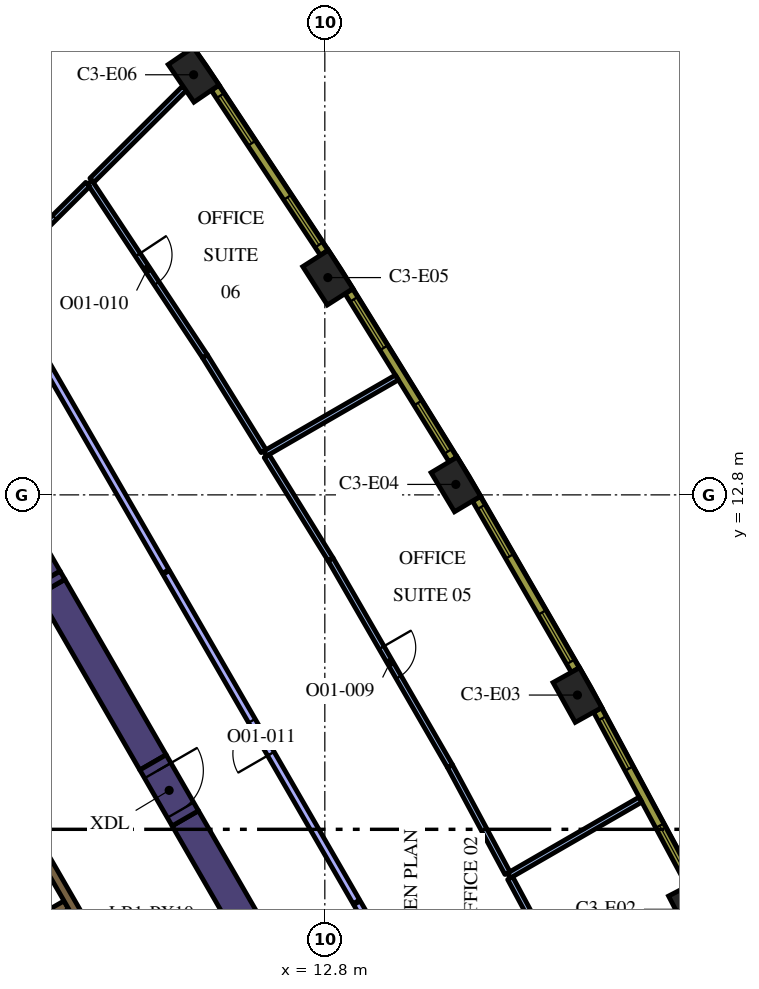
"""IFC4 building model, lengths in metres.
Left out: names, types, materials, properties, quantities, classifications, styles, units other than length and angle.
Written with IfcOpenShell. Run it as: python <this file> out.ifc"""

import sys

from ifc_helpers import new_model, si_unit, direction, frame, frame_2d, origin, origin_2d, place, context, subcontext, project, spatial, polyline, rectangle, outline, extrude, element, fill, save


model = new_model("IFC4")
c1 = context("Model", 3, precision=1e-05, world=origin(), true_north=direction((0.0, 1.0)))
c2 = subcontext(c1, "Body", "Model", "MODEL_VIEW")
j1 = project(units=[si_unit("LENGTHUNIT", "METRE"), si_unit("PLANEANGLEUNIT", "RADIAN")], contexts=[c1])
p1 = place(None, origin())
s1 = spatial("IfcSite", under=j1, at=p1, CompositionType="ELEMENT")
p2 = place(p1, origin())
s2 = spatial("IfcBuilding", under=s1, at=p2, CompositionType="ELEMENT")
p3 = place(p2, frame((0.0, 0.0, 150.0)))
s3 = spatial("IfcBuildingStorey", under=s2, at=p3, CompositionType="ELEMENT", Elevation=150.0)
for number, where, z_axis, x_axis in (
    (1, (22.476, 1.896, 0.0), (0.0, 0.0, 1.0), (-0.46, 0.888, 0.0)),
    (2, (19.447, 7.533, 0.0), (0.0, 0.0, 1.0), (-0.487, 0.874, 0.0)),
    (3, (16.247, 13.075, 0.0), (0.0, 0.0, 1.0), (-0.513, 0.858, 0.0)),
    (4, (12.88, 18.517, 0.0), (0.0, 0.0, 1.0), (-0.539, 0.842, 0.0)),
    (5, (9.348, 23.854, 0.0), (0.0, 0.0, 1.0), (-0.565, 0.825, 0.0)),
):
    element("IfcColumn", number, at=place(p3, frame(where, z_axis=z_axis, x_axis=x_axis)), inside=s3, PredefinedType="COLUMN", context=c2, shape_type="SweptSolid", body=[
        extrude(rectangle(XDim=1.2, YDim=0.8, at=origin_2d()), origin(), (0.0, 0.0, 1.0), 4.2),
    ])
p4 = place(p3, frame((9.129, 4.289, 0.0), z_axis=(0.0, 0.0, 1.0), x_axis=(0.499995742806, -0.866027861663, 0.0)))
e6 = element("IfcWall", 6, at=p4, inside=s3, PredefinedType="SOLIDWALL", context=c2, shape_type="SweptSolid", body=[
    extrude(rectangle(XDim=12.527, YDim=0.8, at=frame_2d((6.264, 0.0))), origin(), (0.0, 0.0, 1.0), 4.2),
])
p5 = place(p3, frame((5.489, 10.594, 0.0), z_axis=(0.0, 0.0, 1.0), x_axis=(-0.500000383388, 0.866025182435, 0.0)))
e7 = element("IfcWall", 7, at=p5, inside=s3, PredefinedType="SOLIDWALL", context=c2, shape_type="SweptSolid", body=[
    extrude(rectangle(XDim=0.558, YDim=0.8, at=frame_2d((0.279, 0.0))), origin(), (0.0, 0.0, 1.0), 4.2),
])
p6 = place(p3, frame((5.615, 10.375, 0.0), z_axis=(0.0, 0.0, 1.0), x_axis=(0.500002746266, -0.866023818221, 0.0)))
e8 = element("IfcWall", 8, at=p6, inside=s3, PredefinedType="SOLIDWALL", context=c2, shape_type="SweptSolid", body=[
    extrude(rectangle(XDim=5.328, YDim=0.8, at=frame_2d((2.664, 0.0))), origin(), (0.0, 0.0, 1.0), 4.2),
])
p7 = place(p3, origin())
e9 = element("IfcWall", 9, at=p7, inside=s3, PredefinedType="SOLIDWALL", context=c2, shape_type="SweptSolid", body=[
    extrude(outline(polyline([(5.432, 10.272), (5.308, 10.487), (5.836, 10.792), (5.96, 10.577), (5.432, 10.272)])), origin(), (0.0, 0.0, 1.0), 4.2),
])
p8 = place(p3, frame((5.97, -2.591, 0.0), z_axis=(0.0, 0.0, 1.0), x_axis=(-0.499994469932, 0.866028596547, 0.0)))
e10 = element("IfcWall", 10, at=p8, inside=s3, PredefinedType="SOLIDWALL", context=c2, shape_type="SweptSolid", body=[
    extrude(rectangle(XDim=10.488, YDim=0.25, at=frame_2d((5.244, 0.0))), origin(), (0.0, 0.0, 1.0), 4.2),
])
p9 = place(p3, frame((4.094, 0.909, 0.0), z_axis=(0.0, 0.0, 1.0), x_axis=(0.866008176907, 0.50002983664, 0.0)))
e11 = element("IfcWall", 11, at=p9, inside=s3, PredefinedType="SOLIDWALL", context=c2, shape_type="SweptSolid", body=[
    extrude(rectangle(XDim=2.2, YDim=0.25, at=frame_2d((1.1, 0.0))), origin(), (0.0, 0.0, 1.0), 4.2),
])
p10 = place(p3, frame((8.565, -2.185, 0.0), z_axis=(0.0, 0.0, 1.0), x_axis=(-0.499997954832, 0.866026584559, 0.0)))
e12 = element("IfcWall", 12, at=p10, inside=s3, PredefinedType="SOLIDWALL", context=c2, shape_type="SweptSolid", body=[
    extrude(rectangle(XDim=12.35, YDim=0.25, at=frame_2d((6.175, 0.0))), origin(), (0.0, 0.0, 1.0), 4.2),
])
p11 = place(p10, frame((0.585, 0.0, 0.0)))
e13 = element("IfcOpeningElement", 13, at=p11, cuts=e12, PredefinedType="OPENING", context=c2, shape_type="SweptSolid", body=[
    extrude(rectangle(XDim=1.1, YDim=2.1, at=frame_2d((0.55, 1.05))), frame((0.0, 0.135, 0.0), z_axis=(0.0, -1.0, 0.0), x_axis=(1.0, 0.0, 0.0)), (0.0, 0.0, 1.0), 0.27),
])
p12 = place(p3, frame((8.279, 5.761, 0.0), z_axis=(0.0, 0.0, 1.0), x_axis=(0.500062241894, -0.865989465428, 0.0)))
e14 = element("IfcWall", 14, at=p12, inside=s3, PredefinedType="SOLIDWALL", context=c2, shape_type="SweptSolid", body=[
    extrude(rectangle(XDim=1.7, YDim=0.8, at=frame_2d((0.85, 0.0))), origin(), (0.0, 0.0, 1.0), 4.2),
])
p13 = place(p12, frame((0.25, 0.0, 0.0)))
e15 = element("IfcOpeningElement", 15, at=p13, cuts=e14, PredefinedType="OPENING", context=c2, shape_type="SweptSolid", body=[
    extrude(rectangle(XDim=1.2, YDim=2.1, at=frame_2d((0.6, 1.05))), frame((0.0, 0.41, 0.0), z_axis=(0.0, -1.0, 0.0), x_axis=(1.0, 0.0, 0.0)), (0.0, 0.0, 1.0), 0.82),
])
p14 = place(p3, frame((17.641, 2.781, 0.0), z_axis=(0.0, 0.0, 1.0), x_axis=(0.866053520969, 0.499951296445, 0.0)))
e16 = element("IfcWall", 16, at=p14, inside=s3, PredefinedType="PARTITIONING", context=c2, shape_type="SweptSolid", body=[
    extrude(rectangle(XDim=4.002, YDim=0.15, at=frame_2d((2.001, 0.0))), origin(), (0.0, 0.0, 1.0), 3.15),
])
p15 = place(p3, frame((19.066, 0.129, 0.0), z_axis=(0.0, 0.0, 1.0), x_axis=(-0.473335829303, 0.880882053795, 0.0)))
e17 = element("IfcWall", 17, at=p15, inside=s3, PredefinedType="PARTITIONING", context=c2, shape_type="SweptSolid", body=[
    extrude(rectangle(XDim=2.935, YDim=0.15, at=frame_2d((1.468, 0.0))), origin(), (0.0, 0.0, 1.0), 3.15),
])
p16 = place(p3, frame((11.229, 13.887, 0.0), z_axis=(0.0, 0.0, 1.0), x_axis=(0.866038271014, 0.499977712642, 0.0)))
e18 = element("IfcWall", 18, at=p16, inside=s3, PredefinedType="PARTITIONING", context=c2, shape_type="SweptSolid", body=[
    extrude(rectangle(XDim=4.002, YDim=0.15, at=frame_2d((2.001, 0.0))), origin(), (0.0, 0.0, 1.0), 3.15),
])
p17 = place(p3, frame((17.606, 2.847, 0.0), z_axis=(0.0, 0.0, 1.0), x_axis=(-0.473348321673, 0.880875340993, 0.0)))
e19 = element("IfcWall", 19, at=p17, inside=s3, PredefinedType="PARTITIONING", context=c2, shape_type="SweptSolid", body=[
    extrude(rectangle(XDim=3.197, YDim=0.15, at=frame_2d((1.599, 0.0))), origin(), (0.0, 0.0, 1.0), 3.15),
])
p18 = place(p3, frame((12.951, 11.104, 0.0), z_axis=(0.0, 0.0, 1.0), x_axis=(0.499992691614, -0.866029623242, 0.0)))
e20 = element("IfcWall", 20, at=p18, inside=s3, PredefinedType="PARTITIONING", context=c2, shape_type="SweptSolid", body=[
    extrude(rectangle(XDim=6.282, YDim=0.15, at=frame_2d((3.141, 0.0))), origin(), (0.0, 0.0, 1.0), 3.15),
])
p19 = place(p18, frame((2.683, 0.0, 0.0)))
e21 = element("IfcOpeningElement", 21, at=p19, cuts=e20, PredefinedType="OPENING", context=c2, shape_type="SweptSolid", body=[
    extrude(rectangle(XDim=0.9, YDim=2.1, at=frame_2d((0.45, 1.05))), frame((0.0, 0.085, 0.0), z_axis=(0.0, -1.0, 0.0), x_axis=(1.0, 0.0, 0.0)), (0.0, 0.0, 1.0), 0.17),
])
p20 = place(p3, frame((12.951, 11.104, 0.0), z_axis=(0.0, 0.0, 1.0), x_axis=(-0.526204763311, 0.850357893518, 0.0)))
e22 = element("IfcWall", 22, at=p20, inside=s3, PredefinedType="PARTITIONING", context=c2, shape_type="SweptSolid", body=[
    extrude(rectangle(XDim=3.197, YDim=0.15, at=frame_2d((1.599, 0.0))), origin(), (0.0, 0.0, 1.0), 3.15),
])
p21 = place(p3, frame((11.19, 13.951, 0.0), z_axis=(0.0, 0.0, 1.0), x_axis=(-0.526165616903, 0.850382116221, 0.0)))
e23 = element("IfcWall", 23, at=p21, inside=s3, PredefinedType="PARTITIONING", context=c2, shape_type="SweptSolid", body=[
    extrude(rectangle(XDim=2.935, YDim=0.15, at=frame_2d((1.468, 0.0))), origin(), (0.0, 0.0, 1.0), 3.15),
])
p22 = place(p3, frame((6.616, 21.024, 0.0), z_axis=(0.0, 0.0, 1.0), x_axis=(0.551915124006, -0.833900291338, 0.0)))
e24 = element("IfcWall", 24, at=p22, inside=s3, PredefinedType="PARTITIONING", context=c2, shape_type="SweptSolid", body=[
    extrude(rectangle(XDim=5.488, YDim=0.15, at=frame_2d((2.744, 0.0))), origin(), (0.0, 0.0, 1.0), 3.15),
])
p23 = place(p22, frame((2.288, 0.0, 0.0)))
e25 = element("IfcOpeningElement", 25, at=p23, cuts=e24, PredefinedType="OPENING", context=c2, shape_type="SweptSolid", body=[
    extrude(rectangle(XDim=0.9, YDim=2.1, at=frame_2d((0.45, 1.05))), frame((0.0, 0.085, 0.0), z_axis=(0.0, -1.0, 0.0), x_axis=(1.0, 0.0, 0.0)), (0.0, 0.0, 1.0), 0.17),
])
p24 = place(p3, frame((6.67, 21.078, 0.0), z_axis=(0.0, 0.0, 1.0), x_axis=(0.709236178776, 0.704970951681, 0.0)))
e26 = element("IfcWall", 26, at=p24, inside=s3, PredefinedType="PARTITIONING", context=c2, shape_type="SweptSolid", body=[
    extrude(rectangle(XDim=3.434, YDim=0.15, at=frame_2d((1.717, 0.0))), origin(), (0.0, 0.0, 1.0), 3.15),
])
p25 = place(p3, frame((4.128, 18.55, 0.0), z_axis=(0.0, 0.0, 1.0), x_axis=(0.709237676072, 0.704969445324, 0.0)))
e27 = element("IfcWall", 27, at=p25, inside=s3, PredefinedType="PARTITIONING", context=c2, shape_type="SweptSolid", body=[
    extrude(rectangle(XDim=3.432, YDim=0.15, at=frame_2d((1.716, 0.0))), origin(), (0.0, 0.0, 1.0), 3.15),
])
p26 = place(p25, frame((1.3, 0.0, 0.0)))
e28 = element("IfcOpeningElement", 28, at=p26, cuts=e27, PredefinedType="OPENING", context=c2, shape_type="SweptSolid", body=[
    extrude(rectangle(XDim=0.9, YDim=2.1, at=frame_2d((0.45, 1.05))), frame((0.0, 0.085, 0.0), z_axis=(0.0, -1.0, 0.0), x_axis=(1.0, 0.0, 0.0)), (0.0, 0.0, 1.0), 0.17),
])
p27 = place(p3, frame((13.63, 2.091, 0.0), z_axis=(0.0, 0.0, 1.0), x_axis=(-0.499990634175, 0.866030811078, 0.0)))
e29 = element("IfcWall", 29, at=p27, inside=s3, PredefinedType="PARTITIONING", context=c2, shape_type="SweptSolid", body=[
    extrude(rectangle(XDim=10.008, YDim=0.2, at=frame_2d((5.004, 0.0))), origin(), (0.0, 0.0, 1.0), 3.15),
])
p28 = place(p27, frame((4.5, 0.0, 0.0)))
e30 = element("IfcOpeningElement", 30, at=p28, cuts=e29, PredefinedType="OPENING", context=c2, shape_type="SweptSolid", body=[
    extrude(rectangle(XDim=1.0, YDim=2.1, at=frame_2d((0.5, 1.05))), frame((0.0, 0.11, 0.0), z_axis=(0.0, -1.0, 0.0), x_axis=(1.0, 0.0, 0.0)), (0.0, 0.0, 1.0), 0.22),
])
p29 = place(p3, frame((8.611, 10.785, 0.0), z_axis=(0.0, 0.0, 1.0), x_axis=(-0.499987928593, 0.866032373102, 0.0)))
e31 = element("IfcWall", 31, at=p29, inside=s3, PredefinedType="PARTITIONING", context=c2, shape_type="SweptSolid", body=[
    extrude(rectangle(XDim=8.889, YDim=0.2, at=frame_2d((4.445, 0.0))), origin(), (0.0, 0.0, 1.0), 3.15),
])
p30 = place(p3, frame((18.504, -6.35, 0.0), z_axis=(0.0, 0.0, 1.0), x_axis=(-0.499995029582, 0.866028273438, 0.0)))
e32 = element("IfcWall", 32, at=p30, inside=s3, PredefinedType="PARTITIONING", context=c2, shape_type="SweptSolid", body=[
    extrude(rectangle(XDim=9.717, YDim=0.2, at=frame_2d((4.859, 0.0))), origin(), (0.0, 0.0, 1.0), 3.15),
])
p31 = place(p3, frame((22.44, 2.555, 0.0), z_axis=(0.0, 0.0, 1.0), x_axis=(-0.473349833294, 0.880874528704, 0.0)))
e33 = element("IfcWall", 33, at=p31, inside=s3, PredefinedType="SOLIDWALL", context=c2, shape_type="SweptSolid", body=[
    extrude(rectangle(XDim=5.204, YDim=0.24, at=frame_2d((2.602, 0.0))), origin(), (0.0, 0.0, 1.0), 3.95),
])
p32 = place(p31, frame((0.248, 0.0, 0.9)))
e34 = element("IfcOpeningElement", 34, at=p32, cuts=e33, PredefinedType="OPENING", context=c2, shape_type="SweptSolid", body=[
    extrude(rectangle(XDim=1.5, YDim=2.55, at=frame_2d((0.75, 1.275))), frame((0.0, 0.13, 0.0), z_axis=(0.0, -1.0, 0.0), x_axis=(1.0, 0.0, 0.0)), (0.0, 0.0, 1.0), 0.26),
])
p33 = place(p31, frame((3.455, 0.0, 0.9)))
e35 = element("IfcOpeningElement", 35, at=p33, cuts=e33, PredefinedType="OPENING", context=c2, shape_type="SweptSolid", body=[
    extrude(rectangle(XDim=1.5, YDim=2.55, at=frame_2d((0.75, 1.275))), frame((0.0, 0.13, 0.0), z_axis=(0.0, -1.0, 0.0), x_axis=(1.0, 0.0, 0.0)), (0.0, 0.0, 1.0), 0.26),
])
p34 = place(p3, frame((19.391, 8.191, 0.0), z_axis=(0.0, 0.0, 1.0), x_axis=(-0.500009456303, 0.866019944116, 0.0)))
e36 = element("IfcWall", 36, at=p34, inside=s3, PredefinedType="SOLIDWALL", context=c2, shape_type="SweptSolid", body=[
    extrude(rectangle(XDim=5.204, YDim=0.24, at=frame_2d((2.602, 0.0))), origin(), (0.0, 0.0, 1.0), 3.95),
])
p35 = place(p34, frame((0.248, 0.0, 0.9)))
e37 = element("IfcOpeningElement", 37, at=p35, cuts=e36, PredefinedType="OPENING", context=c2, shape_type="SweptSolid", body=[
    extrude(rectangle(XDim=1.5, YDim=2.55, at=frame_2d((0.75, 1.275))), frame((0.0, 0.13, 0.0), z_axis=(0.0, -1.0, 0.0), x_axis=(1.0, 0.0, 0.0)), (0.0, 0.0, 1.0), 0.26),
])
p36 = place(p34, frame((3.455, 0.0, 0.9)))
e38 = element("IfcOpeningElement", 38, at=p36, cuts=e36, PredefinedType="OPENING", context=c2, shape_type="SweptSolid", body=[
    extrude(rectangle(XDim=1.5, YDim=2.55, at=frame_2d((0.75, 1.275))), frame((0.0, 0.13, 0.0), z_axis=(0.0, -1.0, 0.0), x_axis=(1.0, 0.0, 0.0)), (0.0, 0.0, 1.0), 0.26),
])
p37 = place(p3, frame((16.171, 13.731, 0.0), z_axis=(0.0, 0.0, 1.0), x_axis=(-0.526197926587, 0.850362124072, 0.0)))
e39 = element("IfcWall", 39, at=p37, inside=s3, PredefinedType="SOLIDWALL", context=c2, shape_type="SweptSolid", body=[
    extrude(rectangle(XDim=5.203, YDim=0.24, at=frame_2d((2.602, 0.0))), origin(), (0.0, 0.0, 1.0), 3.95),
])
p38 = place(p37, frame((0.248, 0.0, 0.9)))
e40 = element("IfcOpeningElement", 40, at=p38, cuts=e39, PredefinedType="OPENING", context=c2, shape_type="SweptSolid", body=[
    extrude(rectangle(XDim=1.5, YDim=2.55, at=frame_2d((0.75, 1.275))), frame((0.0, 0.13, 0.0), z_axis=(0.0, -1.0, 0.0), x_axis=(1.0, 0.0, 0.0)), (0.0, 0.0, 1.0), 0.26),
])
p39 = place(p37, frame((3.455, 0.0, 0.9)))
e41 = element("IfcOpeningElement", 41, at=p39, cuts=e39, PredefinedType="OPENING", context=c2, shape_type="SweptSolid", body=[
    extrude(rectangle(XDim=1.5, YDim=2.55, at=frame_2d((0.75, 1.275))), frame((0.0, 0.13, 0.0), z_axis=(0.0, -1.0, 0.0), x_axis=(1.0, 0.0, 0.0)), (0.0, 0.0, 1.0), 0.26),
])
p40 = place(p3, frame((12.783, 19.171, 0.0), z_axis=(0.0, 0.0, 1.0), x_axis=(-0.551892811511, 0.833915058386, 0.0)))
e42 = element("IfcWall", 42, at=p40, inside=s3, PredefinedType="SOLIDWALL", context=c2, shape_type="SweptSolid", body=[
    extrude(rectangle(XDim=5.204, YDim=0.24, at=frame_2d((2.602, 0.0))), origin(), (0.0, 0.0, 1.0), 3.95),
])
p41 = place(p40, frame((0.248, 0.0, 0.9)))
e43 = element("IfcOpeningElement", 43, at=p41, cuts=e42, PredefinedType="OPENING", context=c2, shape_type="SweptSolid", body=[
    extrude(rectangle(XDim=1.5, YDim=2.55, at=frame_2d((0.75, 1.275))), frame((0.0, 0.13, 0.0), z_axis=(0.0, -1.0, 0.0), x_axis=(1.0, 0.0, 0.0)), (0.0, 0.0, 1.0), 0.26),
])
p42 = place(p40, frame((3.455, 0.0, 0.9)))
e44 = element("IfcOpeningElement", 44, at=p42, cuts=e42, PredefinedType="OPENING", context=c2, shape_type="SweptSolid", body=[
    extrude(rectangle(XDim=1.5, YDim=2.55, at=frame_2d((0.75, 1.275))), frame((0.0, 0.13, 0.0), z_axis=(0.0, -1.0, 0.0), x_axis=(1.0, 0.0, 0.0)), (0.0, 0.0, 1.0), 0.26),
])
p43 = place(p3, frame((9.231, 24.504, 0.0), z_axis=(0.0, 0.0, 1.0), x_axis=(-0.577115207679, 0.816662743772, 0.0)))
e45 = element("IfcWall", 45, at=p43, inside=s3, PredefinedType="SOLIDWALL", context=c2, shape_type="SweptSolid", body=[
    extrude(rectangle(XDim=5.213, YDim=0.24, at=frame_2d((2.606, 0.0))), origin(), (0.0, 0.0, 1.0), 3.95),
])
p44 = place(p43, frame((0.261, 0.0, 0.9)))
e46 = element("IfcOpeningElement", 46, at=p44, cuts=e45, PredefinedType="OPENING", context=c2, shape_type="SweptSolid", body=[
    extrude(rectangle(XDim=1.5, YDim=2.55, at=frame_2d((0.75, 1.275))), frame((0.0, 0.13, 0.0), z_axis=(0.0, -1.0, 0.0), x_axis=(1.0, 0.0, 0.0)), (0.0, 0.0, 1.0), 0.26),
])
p45 = place(p43, frame((3.492, 0.0, 0.9)))
e47 = element("IfcOpeningElement", 47, at=p45, cuts=e45, PredefinedType="OPENING", context=c2, shape_type="SweptSolid", body=[
    extrude(rectangle(XDim=1.5, YDim=2.55, at=frame_2d((0.75, 1.275))), frame((0.0, 0.13, 0.0), z_axis=(0.0, -1.0, 0.0), x_axis=(1.0, 0.0, 0.0)), (0.0, 0.0, 1.0), 0.26),
])
p46 = place(p13, origin())
e48 = element("IfcDoor", 48, at=p46, inside=s3, OperationType="SINGLE_SWING_LEFT", PredefinedType="DOOR", context=c2, shape_type="SweptSolid", body=[
    extrude(rectangle(XDim=1.2, YDim=2.1, at=frame_2d((0.6, 1.05))), frame((0.0, 0.025, 0.0), z_axis=(0.0, -1.0, 0.0), x_axis=(1.0, 0.0, 0.0)), (0.0, 0.0, 1.0), 0.05),
])
fill(e15, e48)
p47 = place(p19, origin())
e49 = element("IfcDoor", 49, at=p47, inside=s3, OperationType="SINGLE_SWING_LEFT", PredefinedType="DOOR", context=c2, shape_type="SweptSolid", body=[
    extrude(rectangle(XDim=0.9, YDim=2.1, at=frame_2d((0.45, 1.05))), frame((0.0, 0.025, 0.0), z_axis=(0.0, -1.0, 0.0), x_axis=(1.0, 0.0, 0.0)), (0.0, 0.0, 1.0), 0.05),
])
fill(e21, e49)
p48 = place(p23, origin())
e50 = element("IfcDoor", 50, at=p48, inside=s3, OperationType="SINGLE_SWING_LEFT", PredefinedType="DOOR", context=c2, shape_type="SweptSolid", body=[
    extrude(rectangle(XDim=0.9, YDim=2.1, at=frame_2d((0.45, 1.05))), frame((0.0, 0.025, 0.0), z_axis=(0.0, -1.0, 0.0), x_axis=(1.0, 0.0, 0.0)), (0.0, 0.0, 1.0), 0.05),
])
fill(e25, e50)
p49 = place(p28, origin())
e51 = element("IfcDoor", 51, at=p49, inside=s3, OperationType="SINGLE_SWING_LEFT", PredefinedType="DOOR", context=c2, shape_type="SweptSolid", body=[
    extrude(rectangle(XDim=1.0, YDim=2.1, at=frame_2d((0.5, 1.05))), frame((0.0, 0.025, 0.0), z_axis=(0.0, -1.0, 0.0), x_axis=(1.0, 0.0, 0.0)), (0.0, 0.0, 1.0), 0.05),
])
fill(e30, e51)
p50 = place(p26, origin())
e52 = element("IfcDoor", 52, at=p50, inside=s3, OperationType="SINGLE_SWING_RIGHT", PredefinedType="DOOR", context=c2, shape_type="SweptSolid", body=[
    extrude(rectangle(XDim=0.9, YDim=2.1, at=frame_2d((0.45, 1.05))), frame((0.0, 0.025, 0.0), z_axis=(0.0, -1.0, 0.0), x_axis=(1.0, 0.0, 0.0)), (0.0, 0.0, 1.0), 0.05),
])
fill(e28, e52)
p51 = place(p32, origin())
e53 = element("IfcWindow", 53, at=p51, inside=s3, PartitioningType="SINGLE_PANEL", PredefinedType="WINDOW", context=c2, shape_type="SweptSolid", body=[
    extrude(rectangle(XDim=1.5, YDim=2.55, at=frame_2d((0.75, 1.275))), frame((0.0, 0.04, 0.0), z_axis=(0.0, -1.0, 0.0), x_axis=(1.0, 0.0, 0.0)), (0.0, 0.0, 1.0), 0.06),
])
fill(e34, e53)
p52 = place(p33, origin())
e54 = element("IfcWindow", 54, at=p52, inside=s3, PartitioningType="SINGLE_PANEL", PredefinedType="WINDOW", context=c2, shape_type="SweptSolid", body=[
    extrude(rectangle(XDim=1.5, YDim=2.55, at=frame_2d((0.75, 1.275))), frame((0.0, 0.04, 0.0), z_axis=(0.0, -1.0, 0.0), x_axis=(1.0, 0.0, 0.0)), (0.0, 0.0, 1.0), 0.06),
])
fill(e35, e54)
p53 = place(p35, origin())
e55 = element("IfcWindow", 55, at=p53, inside=s3, PartitioningType="SINGLE_PANEL", PredefinedType="WINDOW", context=c2, shape_type="SweptSolid", body=[
    extrude(rectangle(XDim=1.5, YDim=2.55, at=frame_2d((0.75, 1.275))), frame((0.0, 0.04, 0.0), z_axis=(0.0, -1.0, 0.0), x_axis=(1.0, 0.0, 0.0)), (0.0, 0.0, 1.0), 0.06),
])
fill(e37, e55)
p54 = place(p36, origin())
e56 = element("IfcWindow", 56, at=p54, inside=s3, PartitioningType="SINGLE_PANEL", PredefinedType="WINDOW", context=c2, shape_type="SweptSolid", body=[
    extrude(rectangle(XDim=1.5, YDim=2.55, at=frame_2d((0.75, 1.275))), frame((0.0, 0.04, 0.0), z_axis=(0.0, -1.0, 0.0), x_axis=(1.0, 0.0, 0.0)), (0.0, 0.0, 1.0), 0.06),
])
fill(e38, e56)
p55 = place(p38, origin())
e57 = element("IfcWindow", 57, at=p55, inside=s3, PartitioningType="SINGLE_PANEL", PredefinedType="WINDOW", context=c2, shape_type="SweptSolid", body=[
    extrude(rectangle(XDim=1.5, YDim=2.55, at=frame_2d((0.75, 1.275))), frame((0.0, 0.04, 0.0), z_axis=(0.0, -1.0, 0.0), x_axis=(1.0, 0.0, 0.0)), (0.0, 0.0, 1.0), 0.06),
])
fill(e40, e57)
p56 = place(p39, origin())
e58 = element("IfcWindow", 58, at=p56, inside=s3, PartitioningType="SINGLE_PANEL", PredefinedType="WINDOW", context=c2, shape_type="SweptSolid", body=[
    extrude(rectangle(XDim=1.5, YDim=2.55, at=frame_2d((0.75, 1.275))), frame((0.0, 0.04, 0.0), z_axis=(0.0, -1.0, 0.0), x_axis=(1.0, 0.0, 0.0)), (0.0, 0.0, 1.0), 0.06),
])
fill(e41, e58)
p57 = place(p41, origin())
e59 = element("IfcWindow", 59, at=p57, inside=s3, PartitioningType="SINGLE_PANEL", PredefinedType="WINDOW", context=c2, shape_type="SweptSolid", body=[
    extrude(rectangle(XDim=1.5, YDim=2.55, at=frame_2d((0.75, 1.275))), frame((0.0, 0.04, 0.0), z_axis=(0.0, -1.0, 0.0), x_axis=(1.0, 0.0, 0.0)), (0.0, 0.0, 1.0), 0.06),
])
fill(e43, e59)
p58 = place(p42, origin())
e60 = element("IfcWindow", 60, at=p58, inside=s3, PartitioningType="SINGLE_PANEL", PredefinedType="WINDOW", context=c2, shape_type="SweptSolid", body=[
    extrude(rectangle(XDim=1.5, YDim=2.55, at=frame_2d((0.75, 1.275))), frame((0.0, 0.04, 0.0), z_axis=(0.0, -1.0, 0.0), x_axis=(1.0, 0.0, 0.0)), (0.0, 0.0, 1.0), 0.06),
])
fill(e44, e60)
save(model, sys.argv[1])
